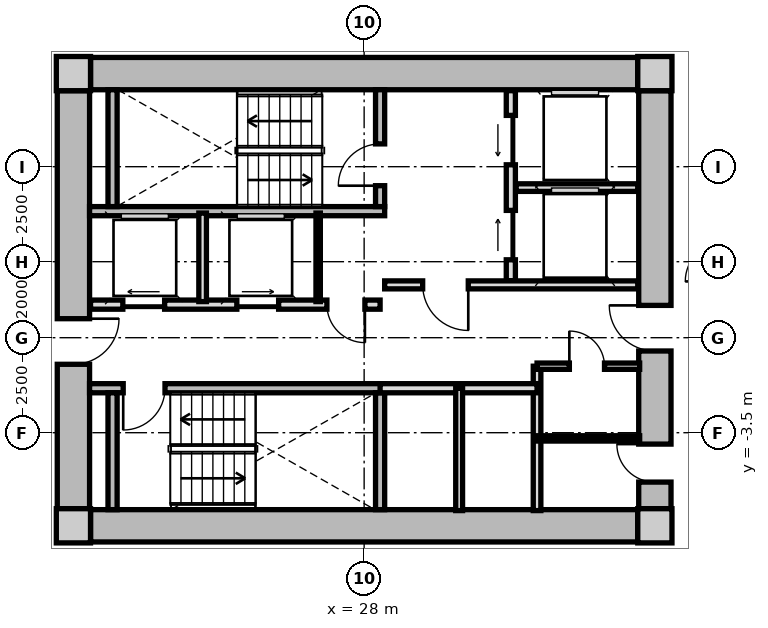
"""IFC4 building model, lengths in metres.
Left out: names, types, materials, properties, quantities, classifications, styles, units other than length and angle.
Written with IfcOpenShell. Run it as: python <this file> out.ifc"""

import sys

from ifc_helpers import new_model, si_unit, direction, frame, frame_2d, origin, origin_2d, place, context, subcontext, project, spatial, rectangle, extrude, source, transform, mapped, element, fill, save


model = new_model("IFC4")
c1 = context("Model", 3, precision=1e-05, world=origin(), true_north=direction((0.0, 1.0)))
c2 = subcontext(c1, "Body", "Model", "MODEL_VIEW")
j1 = project(units=[si_unit("LENGTHUNIT", "METRE"), si_unit("PLANEANGLEUNIT", "RADIAN")], contexts=[c1])
p1 = place(None, origin())
s1 = spatial("IfcSite", under=j1, at=p1, CompositionType="ELEMENT")
p2 = place(p1, origin())
s2 = spatial("IfcBuilding", under=s1, at=p2, CompositionType="ELEMENT")
p3 = place(p2, frame((0.0, 0.0, 36.85)))
s3 = spatial("IfcBuildingStorey", under=s2, at=p3, CompositionType="ELEMENT", Elevation=36.85)
m1 = source(origin(), c2, "Body", "SweptSolid", [
    extrude(rectangle(XDim=0.9, YDim=0.9, at=origin_2d()), origin(), (0.0, 0.0, 1.0), 3.05),
])
for number, where, z_axis, x_axis in (
    (1, (20.35, -5.95, 0.0), (0.0, 0.0, 1.0), (1.0, 0.0, 0.0)),
    (2, (35.65, -5.95, 0.0), (0.0, 0.0, 1.0), (1.0, 0.0, 0.0)),
    (3, (35.65, 5.95, 0.0), (0.0, 0.0, 1.0), (1.0, 0.0, 0.0)),
    (4, (20.35, 5.95, 0.0), (0.0, 0.0, 1.0), (1.0, 0.0, 0.0)),
):
    element("IfcColumn", number, at=place(p3, frame(where, z_axis=z_axis, x_axis=x_axis)), inside=s3, PredefinedType="COLUMN", context=c2, shape_type="MappedRepresentation", body=[
        mapped(m1, transform((0.0, 0.0, 0.0), x_axis=(1.0, 0.0, 0.0), y_axis=(0.0, 1.0, 0.0), z_axis=(0.0, 0.0, 1.0), scale=1.0)),
    ])
m2 = source(origin(), c2, "Body", "SweptSolid", [
    extrude(rectangle(XDim=14.4, YDim=0.85, at=frame_2d((7.2, 0.0))), origin(), (0.0, 0.0, 1.0), 2.79),
])
for number, where, z_axis, x_axis in (
    (5, (20.8, 5.95, 0.0), (0.0, 0.0, 1.0), (1.0, 0.0, 0.0)),
    (6, (35.2, -5.95, 0.0), (0.0, 0.0, 1.0), (-1.0, 0.0, 0.0)),
):
    element("IfcWall", number, at=place(p3, frame(where, z_axis=z_axis, x_axis=x_axis)), inside=s3, PredefinedType="SHEAR", context=c2, shape_type="MappedRepresentation", body=[
        mapped(m2, transform((0.0, 0.0, 0.0), x_axis=(1.0, 0.0, 0.0), y_axis=(0.0, 1.0, 0.0), z_axis=(0.0, 0.0, 1.0), scale=1.0)),
    ])
m3 = source(origin(), c2, "Body", "SweptSolid", [
    extrude(rectangle(XDim=11.0, YDim=0.85, at=frame_2d((5.5, 0.0))), origin(), (0.0, 0.0, 1.0), 2.79),
])
p4 = place(p3, frame((20.35, -5.5, 0.0), z_axis=(0.0, 0.0, 1.0), x_axis=(0.0, 1.0, 0.0)))
e7 = element("IfcWall", 7, at=p4, inside=s3, PredefinedType="SHEAR", context=c2, shape_type="MappedRepresentation", body=[
    mapped(m3, transform((0.0, 0.0, 0.0), x_axis=(1.0, 0.0, 0.0), y_axis=(0.0, 1.0, 0.0), z_axis=(0.0, 0.0, 1.0), scale=1.0)),
])
p5 = place(p4, frame((3.8, 0.0, 0.0)))
e8 = element("IfcOpeningElement", 8, at=p5, cuts=e7, PredefinedType="OPENING", context=c2, shape_type="SweptSolid", body=[
    extrude(rectangle(XDim=1.2, YDim=2.15, at=frame_2d((0.6, 1.075))), frame((0.0, 0.435, 0.0), z_axis=(0.0, -1.0, 0.0), x_axis=(1.0, 0.0, 0.0)), (0.0, 0.0, 1.0), 0.87),
])
p6 = place(p3, frame((35.65, 5.5, 0.0), z_axis=(0.0, 0.0, 1.0), x_axis=(0.0, -1.0, 0.0)))
e9 = element("IfcWall", 9, at=p6, inside=s3, PredefinedType="SHEAR", context=c2, shape_type="MappedRepresentation", body=[
    mapped(m3, transform((0.0, 0.0, 0.0), x_axis=(1.0, 0.0, 0.0), y_axis=(0.0, 1.0, 0.0), z_axis=(0.0, 0.0, 1.0), scale=1.0)),
])
p7 = place(p6, frame((5.65, 0.0, 0.0)))
e10 = element("IfcOpeningElement", 10, at=p7, cuts=e9, PredefinedType="OPENING", context=c2, shape_type="SweptSolid", body=[
    extrude(rectangle(XDim=1.2, YDim=2.15, at=frame_2d((0.6, 1.075))), frame((0.0, 0.435, 0.0), z_axis=(0.0, -1.0, 0.0), x_axis=(1.0, 0.0, 0.0)), (0.0, 0.0, 1.0), 0.87),
])
p8 = place(p6, frame((9.3, 0.0, 0.0)))
e11 = element("IfcOpeningElement", 11, at=p8, cuts=e9, PredefinedType="OPENING", context=c2, shape_type="SweptSolid", body=[
    extrude(rectangle(XDim=1.0, YDim=2.1, at=frame_2d((0.5, 1.05))), frame((0.0, 0.435, 0.0), z_axis=(0.0, -1.0, 0.0), x_axis=(1.0, 0.0, 0.0)), (0.0, 0.0, 1.0), 0.87),
])
m4 = source(origin(), c2, "Body", "SweptSolid", [
    extrude(rectangle(XDim=7.765, YDim=0.24, at=frame_2d((3.883, 0.0))), origin(), (0.0, 0.0, 1.0), 2.79),
])
p9 = place(p3, frame((20.775, 2.33, 0.0), z_axis=(0.0, 0.0, 1.0), x_axis=(1.0, 0.0, 0.0)))
e12 = element("IfcWall", 12, at=p9, inside=s3, PredefinedType="PARTITIONING", context=c2, shape_type="MappedRepresentation", body=[
    mapped(m4, transform((0.0, 0.0, 0.0), x_axis=(1.0, 0.0, 0.0), y_axis=(0.0, 1.0, 0.0), z_axis=(0.0, 0.0, 1.0), scale=1.0)),
])
m5 = source(origin(), c2, "Body", "SweptSolid", [
    extrude(rectangle(XDim=3.075, YDim=0.24, at=frame_2d((1.538, 0.0))), origin(), (0.0, 0.0, 1.0), 2.79),
])
p10 = place(p3, frame((21.38, 2.45, 0.0), z_axis=(0.0, 0.0, 1.0), x_axis=(0.0, 1.0, 0.0)))
e13 = element("IfcWall", 13, at=p10, inside=s3, PredefinedType="PARTITIONING", context=c2, shape_type="MappedRepresentation", body=[
    mapped(m5, transform((0.0, 0.0, 0.0), x_axis=(1.0, 0.0, 0.0), y_axis=(0.0, 1.0, 0.0), z_axis=(0.0, 0.0, 1.0), scale=1.0)),
])
p11 = place(p3, frame((28.42, 2.45, 0.0), z_axis=(0.0, 0.0, 1.0), x_axis=(0.0, 1.0, 0.0)))
e14 = element("IfcWall", 14, at=p11, inside=s3, PredefinedType="PARTITIONING", context=c2, shape_type="MappedRepresentation", body=[
    mapped(m5, transform((0.0, 0.0, 0.0), x_axis=(1.0, 0.0, 0.0), y_axis=(0.0, 1.0, 0.0), z_axis=(0.0, 0.0, 1.0), scale=1.0)),
])
p12 = place(p11, frame((0.55, 0.0, 0.0)))
e15 = element("IfcOpeningElement", 15, at=p12, cuts=e14, PredefinedType="OPENING", context=c2, shape_type="SweptSolid", body=[
    extrude(rectangle(XDim=1.1, YDim=2.15, at=frame_2d((0.55, 1.075))), frame((0.0, 0.13, 0.0), z_axis=(0.0, -1.0, 0.0), x_axis=(1.0, 0.0, 0.0)), (0.0, 0.0, 1.0), 0.26),
])
p13 = place(p3, frame((20.775, -2.33, 0.0), z_axis=(0.0, 0.0, 1.0), x_axis=(1.0, 0.0, 0.0)))
e16 = element("IfcWall", 16, at=p13, inside=s3, PredefinedType="PARTITIONING", context=c2, shape_type="MappedRepresentation", body=[
    mapped(m4, transform((0.0, 0.0, 0.0), x_axis=(1.0, 0.0, 0.0), y_axis=(0.0, 1.0, 0.0), z_axis=(0.0, 0.0, 1.0), scale=1.0)),
])
p14 = place(p13, frame((0.885, 0.0, 0.0)))
e17 = element("IfcOpeningElement", 17, at=p14, cuts=e16, PredefinedType="OPENING", context=c2, shape_type="SweptSolid", body=[
    extrude(rectangle(XDim=1.1, YDim=2.15, at=frame_2d((0.55, 1.075))), frame((0.0, 0.13, 0.0), z_axis=(0.0, -1.0, 0.0), x_axis=(1.0, 0.0, 0.0)), (0.0, 0.0, 1.0), 0.26),
])
for number, where, z_axis, x_axis in (
    (18, (21.38, -5.525, 0.0), (0.0, 0.0, 1.0), (0.0, 1.0, 0.0)),
    (19, (28.42, -5.525, 0.0), (0.0, 0.0, 1.0), (0.0, 1.0, 0.0)),
):
    element("IfcWall", number, at=place(p3, frame(where, z_axis=z_axis, x_axis=x_axis)), inside=s3, PredefinedType="PARTITIONING", context=c2, shape_type="MappedRepresentation", body=[
        mapped(m5, transform((0.0, 0.0, 0.0), x_axis=(1.0, 0.0, 0.0), y_axis=(0.0, 1.0, 0.0), z_axis=(0.0, 0.0, 1.0), scale=1.0)),
    ])
m6 = source(origin(), c2, "Body", "SweptSolid", [
    extrude(rectangle(XDim=5.0, YDim=0.24, at=frame_2d((2.5, 0.0))), origin(), (0.0, 0.0, 1.0), 2.775),
])
p15 = place(p3, frame((31.86, 0.5, 0.0), z_axis=(0.0, 0.0, 1.0), x_axis=(0.0, 1.0, 0.0)))
e20 = element("IfcWall", 20, at=p15, inside=s3, PredefinedType="PARTITIONING", context=c2, shape_type="MappedRepresentation", body=[
    mapped(m6, transform((0.0, 0.0, 0.0), x_axis=(1.0, 0.0, 0.0), y_axis=(0.0, 1.0, 0.0), z_axis=(0.0, 0.0, 1.0), scale=1.0)),
])
p16 = place(p15, frame((3.05, 0.0, 0.0)))
e21 = element("IfcOpeningElement", 21, at=p16, cuts=e20, PredefinedType="OPENING", context=c2, shape_type="SweptSolid", body=[
    extrude(rectangle(XDim=1.3, YDim=2.2, at=frame_2d((0.65, 1.1))), frame((0.0, 0.13, 0.0), z_axis=(0.0, -1.0, 0.0), x_axis=(1.0, 0.0, 0.0)), (0.0, 0.0, 1.0), 0.26),
])
p17 = place(p15, frame((0.55, 0.0, 0.0)))
e22 = element("IfcOpeningElement", 22, at=p17, cuts=e20, PredefinedType="OPENING", context=c2, shape_type="SweptSolid", body=[
    extrude(rectangle(XDim=1.3, YDim=2.2, at=frame_2d((0.65, 1.1))), frame((0.0, 0.13, 0.0), z_axis=(0.0, -1.0, 0.0), x_axis=(1.0, 0.0, 0.0)), (0.0, 0.0, 1.0), 0.26),
])
m7 = source(origin(), c2, "Body", "SweptSolid", [
    extrude(rectangle(XDim=3.2, YDim=0.2, at=frame_2d((1.6, 0.0))), origin(), (0.0, 0.0, 1.0), 2.775),
])
p18 = place(p3, frame((32.0, 2.95, 0.0), z_axis=(0.0, 0.0, 1.0), x_axis=(1.0, 0.0, 0.0)))
e23 = element("IfcWall", 23, at=p18, inside=s3, PredefinedType="PARTITIONING", context=c2, shape_type="MappedRepresentation", body=[
    mapped(m7, transform((0.0, 0.0, 0.0), x_axis=(1.0, 0.0, 0.0), y_axis=(0.0, 1.0, 0.0), z_axis=(0.0, 0.0, 1.0), scale=1.0)),
])
m8 = source(origin(), c2, "Body", "SweptSolid", [
    extrude(rectangle(XDim=6.66, YDim=0.21, at=frame_2d((3.33, 0.0))), origin(), (0.0, 0.0, 1.0), 2.775),
])
p19 = place(p3, frame((28.54, 0.39, 0.0), z_axis=(0.0, 0.0, 1.0), x_axis=(1.0, 0.0, 0.0)))
e24 = element("IfcWall", 24, at=p19, inside=s3, PredefinedType="PARTITIONING", context=c2, shape_type="MappedRepresentation", body=[
    mapped(m8, transform((0.0, 0.0, 0.0), x_axis=(1.0, 0.0, 0.0), y_axis=(0.0, 1.0, 0.0), z_axis=(0.0, 0.0, 1.0), scale=1.0)),
])
p20 = place(p19, frame((1.0, 0.0, 0.0)))
e25 = element("IfcOpeningElement", 25, at=p20, cuts=e24, PredefinedType="OPENING", context=c2, shape_type="SweptSolid", body=[
    extrude(rectangle(XDim=1.2, YDim=2.15, at=frame_2d((0.6, 1.075))), frame((0.0, 0.115, 0.0), z_axis=(0.0, -1.0, 0.0), x_axis=(1.0, 0.0, 0.0)), (0.0, 0.0, 1.0), 0.23),
])
m9 = source(origin(), c2, "Body", "SweptSolid", [
    extrude(rectangle(XDim=7.62, YDim=0.24, at=frame_2d((3.81, 0.0))), origin(), (0.0, 0.0, 1.0), 2.775),
])
p21 = place(p3, frame((20.8, -0.13, 0.0), z_axis=(0.0, 0.0, 1.0), x_axis=(1.0, 0.0, 0.0)))
e26 = element("IfcWall", 26, at=p21, inside=s3, PredefinedType="PARTITIONING", context=c2, shape_type="MappedRepresentation", body=[
    mapped(m9, transform((0.0, 0.0, 0.0), x_axis=(1.0, 0.0, 0.0), y_axis=(0.0, 1.0, 0.0), z_axis=(0.0, 0.0, 1.0), scale=1.0)),
])
p22 = place(p21, frame((6.22, 0.0, 0.0)))
e27 = element("IfcOpeningElement", 27, at=p22, cuts=e26, PredefinedType="OPENING", context=c2, shape_type="SweptSolid", body=[
    extrude(rectangle(XDim=1.0, YDim=2.1, at=frame_2d((0.5, 1.05))), frame((0.0, 0.13, 0.0), z_axis=(0.0, -1.0, 0.0), x_axis=(1.0, 0.0, 0.0)), (0.0, 0.0, 1.0), 0.26),
])
p23 = place(p21, frame((0.85, 0.0, 0.0)))
e28 = element("IfcOpeningElement", 28, at=p23, cuts=e26, PredefinedType="OPENING", context=c2, shape_type="SweptSolid", body=[
    extrude(rectangle(XDim=1.1, YDim=2.2, at=frame_2d((0.55, 1.1))), frame((0.0, 0.13, 0.0), z_axis=(0.0, -1.0, 0.0), x_axis=(1.0, 0.0, 0.0)), (0.0, 0.0, 1.0), 0.26),
])
p24 = place(p21, frame((3.85, 0.0, 0.0)))
e29 = element("IfcOpeningElement", 29, at=p24, cuts=e26, PredefinedType="OPENING", context=c2, shape_type="SweptSolid", body=[
    extrude(rectangle(XDim=1.1, YDim=2.2, at=frame_2d((0.55, 1.1))), frame((0.0, 0.13, 0.0), z_axis=(0.0, -1.0, 0.0), x_axis=(1.0, 0.0, 0.0)), (0.0, 0.0, 1.0), 0.26),
])
m10 = source(origin(), c2, "Body", "SweptSolid", [
    extrude(rectangle(XDim=2.33, YDim=0.115, at=frame_2d((1.165, 0.0))), origin(), (0.0, 0.0, 1.0), 2.775),
])
p25 = place(p3, frame((26.79, -0.05, 0.0), z_axis=(0.0, 0.0, 1.0), x_axis=(0.0, 1.0, 0.0)))
e30 = element("IfcWall", 30, at=p25, inside=s3, PredefinedType="PARTITIONING", context=c2, shape_type="MappedRepresentation", body=[
    mapped(m10, transform((0.0, 0.0, 0.0), x_axis=(1.0, 0.0, 0.0), y_axis=(0.0, 1.0, 0.0), z_axis=(0.0, 0.0, 1.0), scale=1.0)),
])
m11 = source(origin(), c2, "Body", "SweptSolid", [
    extrude(rectangle(XDim=2.33, YDim=0.2, at=frame_2d((1.165, 0.0))), origin(), (0.0, 0.0, 1.0), 2.775),
])
p26 = place(p3, frame((23.75, -0.05, 0.0), z_axis=(0.0, 0.0, 1.0), x_axis=(0.0, 1.0, 0.0)))
e31 = element("IfcWall", 31, at=p26, inside=s3, PredefinedType="PARTITIONING", context=c2, shape_type="MappedRepresentation", body=[
    mapped(m11, transform((0.0, 0.0, 0.0), x_axis=(1.0, 0.0, 0.0), y_axis=(0.0, 1.0, 0.0), z_axis=(0.0, 0.0, 1.0), scale=1.0)),
])
m12 = source(origin(), c2, "Body", "SweptSolid", [
    extrude(rectangle(XDim=3.8, YDim=0.2, at=frame_2d((1.9, 0.0))), origin(), (0.0, 0.0, 1.0), 2.775),
])
p27 = place(p3, frame((32.55, -5.55, 0.0), z_axis=(0.0, 0.0, 1.0), x_axis=(0.0, 1.0, 0.0)))
e32 = element("IfcWall", 32, at=p27, inside=s3, PredefinedType="PARTITIONING", context=c2, shape_type="MappedRepresentation", body=[
    mapped(m12, transform((0.0, 0.0, 0.0), x_axis=(1.0, 0.0, 0.0), y_axis=(0.0, 1.0, 0.0), z_axis=(0.0, 0.0, 1.0), scale=1.0)),
])
m13 = source(origin(), c2, "Body", "SweptSolid", [
    extrude(rectangle(XDim=4.13, YDim=0.24, at=frame_2d((2.065, 0.0))), origin(), (0.0, 0.0, 1.0), 2.775),
])
p28 = place(p3, frame((28.42, -2.33, 0.0), z_axis=(0.0, 0.0, 1.0), x_axis=(1.0, 0.0, 0.0)))
e33 = element("IfcWall", 33, at=p28, inside=s3, PredefinedType="PARTITIONING", context=c2, shape_type="MappedRepresentation", body=[
    mapped(m13, transform((0.0, 0.0, 0.0), x_axis=(1.0, 0.0, 0.0), y_axis=(0.0, 1.0, 0.0), z_axis=(0.0, 0.0, 1.0), scale=1.0)),
])
m14 = source(origin(), c2, "Body", "SweptSolid", [
    extrude(rectangle(XDim=3.22, YDim=0.18, at=frame_2d((1.61, 0.0))), origin(), (0.0, 0.0, 1.0), 2.775),
])
p29 = place(p3, frame((30.5, -5.55, 0.0), z_axis=(0.0, 0.0, 1.0), x_axis=(0.0, 1.0, 0.0)))
e34 = element("IfcWall", 34, at=p29, inside=s3, PredefinedType="PARTITIONING", context=c2, shape_type="MappedRepresentation", body=[
    mapped(m14, transform((0.0, 0.0, 0.0), x_axis=(1.0, 0.0, 0.0), y_axis=(0.0, 1.0, 0.0), z_axis=(0.0, 0.0, 1.0), scale=1.0)),
])
m15 = source(origin(), c2, "Body", "SweptSolid", [
    extrude(rectangle(XDim=2.7, YDim=0.165, at=frame_2d((1.35, 0.0))), origin(), (0.0, 0.0, 1.0), 2.775),
])
p30 = place(p3, frame((32.55, -1.75, 0.0), z_axis=(0.0, 0.0, 1.0), x_axis=(1.0, 0.0, 0.0)))
e35 = element("IfcWall", 35, at=p30, inside=s3, PredefinedType="PARTITIONING", context=c2, shape_type="MappedRepresentation", body=[
    mapped(m15, transform((0.0, 0.0, 0.0), x_axis=(1.0, 0.0, 0.0), y_axis=(0.0, 1.0, 0.0), z_axis=(0.0, 0.0, 1.0), scale=1.0)),
])
p31 = place(p30, frame((0.85, 0.0, 0.0)))
e36 = element("IfcOpeningElement", 36, at=p31, cuts=e35, PredefinedType="OPENING", context=c2, shape_type="SweptSolid", body=[
    extrude(rectangle(XDim=0.925, YDim=2.1, at=frame_2d((0.462, 1.05))), frame((0.0, 0.093, 0.0), z_axis=(0.0, -1.0, 0.0), x_axis=(1.0, 0.0, 0.0)), (0.0, 0.0, 1.0), 0.185),
])
m16 = source(origin(), c2, "Body", "SweptSolid", [
    extrude(rectangle(XDim=2.7, YDim=0.14, at=frame_2d((1.35, 0.0))), origin(), (0.0, 0.0, 1.0), 2.775),
])
p32 = place(p3, frame((32.55, -3.65, 0.0), z_axis=(0.0, 0.0, 1.0), x_axis=(1.0, 0.0, 0.0)))
e37 = element("IfcWall", 37, at=p32, inside=s3, PredefinedType="PARTITIONING", context=c2, shape_type="MappedRepresentation", body=[
    mapped(m16, transform((0.0, 0.0, 0.0), x_axis=(1.0, 0.0, 0.0), y_axis=(0.0, 1.0, 0.0), z_axis=(0.0, 0.0, 1.0), scale=1.0)),
])
m17 = source(origin(), c2, "Body", "SweptSolid", [
    extrude(rectangle(XDim=1.1, YDim=2.15, at=frame_2d((0.55, 1.075))), frame((0.0, 0.025, 0.0), z_axis=(0.0, -1.0, 0.0), x_axis=(1.0, 0.0, 0.0)), (0.0, 0.0, 1.0), 0.05),
])
p33 = place(p12, origin())
e38 = element("IfcDoor", 38, at=p33, inside=s3, OperationType="SINGLE_SWING_LEFT", PredefinedType="DOOR", context=c2, shape_type="MappedRepresentation", body=[
    mapped(m17, transform((0.0, 0.0, 0.0), x_axis=(1.0, 0.0, 0.0), y_axis=(0.0, 1.0, 0.0), z_axis=(0.0, 0.0, 1.0), scale=1.0)),
])
fill(e15, e38)
p34 = place(p14, frame((1.1, 0.0, 0.0), z_axis=(0.0, 0.0, 1.0), x_axis=(-1.0, 0.0, 0.0)))
e39 = element("IfcDoor", 39, at=p34, inside=s3, OperationType="SINGLE_SWING_RIGHT", PredefinedType="DOOR", context=c2, shape_type="MappedRepresentation", body=[
    mapped(m17, transform((0.0, 0.0, 0.0), x_axis=(1.0, 0.0, 0.0), y_axis=(0.0, 1.0, 0.0), z_axis=(0.0, 0.0, 1.0), scale=1.0)),
])
fill(e17, e39)
m18 = source(origin(), c2, "Body", "SweptSolid", [
    extrude(rectangle(XDim=1.3, YDim=2.2, at=frame_2d((0.65, 1.1))), frame((0.0, 0.025, 0.0), z_axis=(0.0, -1.0, 0.0), x_axis=(1.0, 0.0, 0.0)), (0.0, 0.0, 1.0), 0.05),
])
p35 = place(p16, origin())
e40 = element("IfcDoor", 40, at=p35, inside=s3, OperationType="SLIDING_TO_LEFT", PredefinedType="DOOR", context=c2, shape_type="MappedRepresentation", body=[
    mapped(m18, transform((0.0, 0.0, 0.0), x_axis=(1.0, 0.0, 0.0), y_axis=(0.0, 1.0, 0.0), z_axis=(0.0, 0.0, 1.0), scale=1.0)),
])
fill(e21, e40)
p36 = place(p17, origin())
e41 = element("IfcDoor", 41, at=p36, inside=s3, OperationType="SLIDING_TO_RIGHT", PredefinedType="DOOR", context=c2, shape_type="MappedRepresentation", body=[
    mapped(m18, transform((0.0, 0.0, 0.0), x_axis=(1.0, 0.0, 0.0), y_axis=(0.0, 1.0, 0.0), z_axis=(0.0, 0.0, 1.0), scale=1.0)),
])
fill(e22, e41)
m19 = source(origin(), c2, "Body", "SweptSolid", [
    extrude(rectangle(XDim=1.2, YDim=2.15, at=frame_2d((0.6, 1.075))), frame((0.0, 0.025, 0.0), z_axis=(0.0, -1.0, 0.0), x_axis=(1.0, 0.0, 0.0)), (0.0, 0.0, 1.0), 0.05),
])
p37 = place(p20, frame((1.2, 0.0, 0.0), z_axis=(0.0, 0.0, 1.0), x_axis=(-1.0, 0.0, 0.0)))
e42 = element("IfcDoor", 42, at=p37, inside=s3, OperationType="SINGLE_SWING_LEFT", PredefinedType="DOOR", context=c2, shape_type="MappedRepresentation", body=[
    mapped(m19, transform((0.0, 0.0, 0.0), x_axis=(1.0, 0.0, 0.0), y_axis=(0.0, 1.0, 0.0), z_axis=(0.0, 0.0, 1.0), scale=1.0)),
])
fill(e25, e42)
p38 = place(p5, frame((1.2, 0.0, 0.0), z_axis=(0.0, 0.0, 1.0), x_axis=(-1.0, 0.0, 0.0)))
e43 = element("IfcDoor", 43, at=p38, inside=s3, OperationType="SINGLE_SWING_LEFT", PredefinedType="DOOR", context=c2, shape_type="MappedRepresentation", body=[
    mapped(m19, transform((0.0, 0.0, 0.0), x_axis=(1.0, 0.0, 0.0), y_axis=(0.0, 1.0, 0.0), z_axis=(0.0, 0.0, 1.0), scale=1.0)),
])
fill(e8, e43)
p39 = place(p7, frame((1.2, 0.0, 0.0), z_axis=(0.0, 0.0, 1.0), x_axis=(-1.0, 0.0, 0.0)))
e44 = element("IfcDoor", 44, at=p39, inside=s3, OperationType="SINGLE_SWING_RIGHT", PredefinedType="DOOR", context=c2, shape_type="MappedRepresentation", body=[
    mapped(m19, transform((0.0, 0.0, 0.0), x_axis=(1.0, 0.0, 0.0), y_axis=(0.0, 1.0, 0.0), z_axis=(0.0, 0.0, 1.0), scale=1.0)),
])
fill(e10, e44)
m20 = source(origin(), c2, "Body", "SweptSolid", [
    extrude(rectangle(XDim=1.0, YDim=2.1, at=frame_2d((0.5, 1.05))), frame((0.0, 0.025, 0.0), z_axis=(0.0, -1.0, 0.0), x_axis=(1.0, 0.0, 0.0)), (0.0, 0.0, 1.0), 0.05),
])
p40 = place(p22, frame((1.0, 0.0, 0.0), z_axis=(0.0, 0.0, 1.0), x_axis=(-1.0, 0.0, 0.0)))
e45 = element("IfcDoor", 45, at=p40, inside=s3, OperationType="SINGLE_SWING_LEFT", PredefinedType="DOOR", context=c2, shape_type="MappedRepresentation", body=[
    mapped(m20, transform((0.0, 0.0, 0.0), x_axis=(1.0, 0.0, 0.0), y_axis=(0.0, 1.0, 0.0), z_axis=(0.0, 0.0, 1.0), scale=1.0)),
])
fill(e27, e45)
m21 = source(origin(), c2, "Body", "SweptSolid", [
    extrude(rectangle(XDim=1.1, YDim=2.2, at=frame_2d((0.55, 1.1))), frame((0.0, 0.025, 0.0), z_axis=(0.0, -1.0, 0.0), x_axis=(1.0, 0.0, 0.0)), (0.0, 0.0, 1.0), 0.05),
])
p41 = place(p23, origin())
e46 = element("IfcDoor", 46, at=p41, inside=s3, OperationType="SLIDING_TO_LEFT", PredefinedType="DOOR", context=c2, shape_type="MappedRepresentation", body=[
    mapped(m21, transform((0.0, 0.0, 0.0), x_axis=(1.0, 0.0, 0.0), y_axis=(0.0, 1.0, 0.0), z_axis=(0.0, 0.0, 1.0), scale=1.0)),
])
fill(e28, e46)
p42 = place(p24, origin())
e47 = element("IfcDoor", 47, at=p42, inside=s3, OperationType="SLIDING_TO_RIGHT", PredefinedType="DOOR", context=c2, shape_type="MappedRepresentation", body=[
    mapped(m21, transform((0.0, 0.0, 0.0), x_axis=(1.0, 0.0, 0.0), y_axis=(0.0, 1.0, 0.0), z_axis=(0.0, 0.0, 1.0), scale=1.0)),
])
fill(e29, e47)
m22 = source(origin(), c2, "Body", "SweptSolid", [
    extrude(rectangle(XDim=0.925, YDim=2.1, at=frame_2d((0.462, 1.05))), frame((0.0, 0.025, 0.0), z_axis=(0.0, -1.0, 0.0), x_axis=(1.0, 0.0, 0.0)), (0.0, 0.0, 1.0), 0.05),
])
p43 = place(p31, origin())
e48 = element("IfcDoor", 48, at=p43, inside=s3, OperationType="SINGLE_SWING_LEFT", PredefinedType="DOOR", context=c2, shape_type="MappedRepresentation", body=[
    mapped(m22, transform((0.0, 0.0, 0.0), x_axis=(1.0, 0.0, 0.0), y_axis=(0.0, 1.0, 0.0), z_axis=(0.0, 0.0, 1.0), scale=1.0)),
])
fill(e36, e48)
p44 = place(p8, frame((1.0, 0.0, 0.0), z_axis=(0.0, 0.0, 1.0), x_axis=(-1.0, 0.0, 0.0)))
e49 = element("IfcDoor", 49, at=p44, inside=s3, OperationType="SINGLE_SWING_RIGHT", PredefinedType="DOOR", context=c2, shape_type="MappedRepresentation", body=[
    mapped(m20, transform((0.0, 0.0, 0.0), x_axis=(1.0, 0.0, 0.0), y_axis=(0.0, 1.0, 0.0), z_axis=(0.0, 0.0, 1.0), scale=1.0)),
])
fill(e11, e49)
save(model, sys.argv[1])
